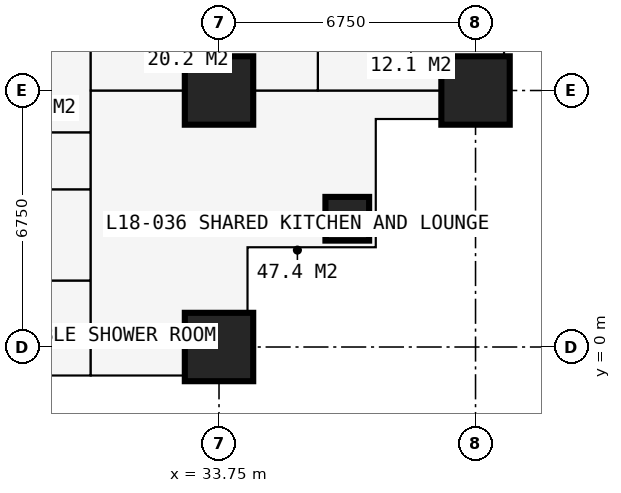
"""IFC4 building model, lengths in metres.
Left out: names, types, materials, properties, quantities, classifications, styles, units other than length and angle.
Written with IfcOpenShell. Run it as: python <this file> out.ifc"""

import sys

from ifc_helpers import new_model, si_unit, direction, frame, frame_2d, origin, origin_2d, place, context, subcontext, project, spatial, rectangle, extrude, element, fill, save


model = new_model("IFC4")
c1 = context("Model", 3, precision=1e-05, world=origin(), true_north=direction((0.0, 1.0)))
c2 = subcontext(c1, "Body", "Model", "MODEL_VIEW")
j1 = project(units=[si_unit("LENGTHUNIT", "METRE"), si_unit("PLANEANGLEUNIT", "RADIAN")], contexts=[c1])
p1 = place(None, origin())
s1 = spatial("IfcSite", under=j1, at=p1, CompositionType="ELEMENT")
p2 = place(p1, origin())
s2 = spatial("IfcBuilding", under=s1, at=p2, CompositionType="ELEMENT")
p3 = place(p2, frame((0.0, 0.0, 68.4)))
s3 = spatial("IfcBuildingStorey", under=s2, at=p3, CompositionType="ELEMENT", Elevation=68.4)
for number, where, z_axis, x_axis in (
    (1, (33.75, 0.0, 0.0), (0.0, 0.0, 1.0), (1.0, 0.0, 0.0)),
    (2, (33.75, 6.75, 0.0), (0.0, 0.0, 1.0), (1.0, 0.0, 0.0)),
):
    element("IfcColumn", number, at=place(p3, frame(where, z_axis=z_axis, x_axis=x_axis)), inside=s3, PredefinedType="COLUMN", context=c2, shape_type="SweptSolid", body=[
        extrude(rectangle(XDim=1.8, YDim=1.8, at=origin_2d()), origin(), (0.0, 0.0, 1.0), 3.6),
    ])
p4 = place(p3, frame((37.125, 3.375, 0.0), z_axis=(0.0, 0.0, 1.0), x_axis=(1.0, 0.0, 0.0)))
e3 = element("IfcColumn", 3, at=p4, inside=s3, PredefinedType="COLUMN", context=c2, shape_type="SweptSolid", body=[
    extrude(rectangle(XDim=1.15, YDim=1.15, at=origin_2d()), origin(), (0.0, 0.0, 1.0), 3.6),
])
p5 = place(p3, frame((40.5, 6.75, 0.0), z_axis=(0.0, 0.0, 1.0), x_axis=(1.0, 0.0, 0.0)))
e4 = element("IfcColumn", 4, at=p5, inside=s3, PredefinedType="COLUMN", context=c2, shape_type="SweptSolid", body=[
    extrude(rectangle(XDim=1.8, YDim=1.8, at=origin_2d()), origin(), (0.0, 0.0, 1.0), 3.6),
])
p6 = place(p3, frame((34.5, -0.75, 0.0), z_axis=(0.0, 0.0, 1.0), x_axis=(0.0, 1.0, 0.0)))
e5 = element("IfcWall", 5, at=p6, inside=s3, PredefinedType="SOLIDWALL", context=c2, shape_type="SweptSolid", body=[
    extrude(rectangle(XDim=3.375, YDim=0.3, at=frame_2d((1.688, 0.0))), origin(), (0.0, 0.0, 1.0), 3.375),
])
p7 = place(p6, frame((1.833, 0.0, 0.9)))
e6 = element("IfcOpeningElement", 6, at=p7, cuts=e5, PredefinedType="OPENING", context=c2, shape_type="SweptSolid", body=[
    extrude(rectangle(XDim=1.2, YDim=1.8, at=frame_2d((0.6, 0.9))), frame((0.0, 0.16, 0.0), z_axis=(0.0, -1.0, 0.0), x_axis=(1.0, 0.0, 0.0)), (0.0, 0.0, 1.0), 0.32),
])
p8 = place(p3, frame((34.5, 2.625, 0.0), z_axis=(0.0, 0.0, 1.0), x_axis=(1.0, 0.0, 0.0)))
e7 = element("IfcWall", 7, at=p8, inside=s3, PredefinedType="SOLIDWALL", context=c2, shape_type="SweptSolid", body=[
    extrude(rectangle(XDim=3.375, YDim=0.3, at=frame_2d((1.688, 0.0))), origin(), (0.0, 0.0, 1.0), 3.375),
])
p9 = place(p8, frame((0.788, 0.0, 0.6)))
e8 = element("IfcOpeningElement", 8, at=p9, cuts=e7, PredefinedType="OPENING", context=c2, shape_type="SweptSolid", body=[
    extrude(rectangle(XDim=1.8, YDim=2.1, at=frame_2d((0.9, 1.05))), frame((0.0, 0.16, 0.0), z_axis=(0.0, -1.0, 0.0), x_axis=(1.0, 0.0, 0.0)), (0.0, 0.0, 1.0), 0.32),
])
p10 = place(p3, frame((37.875, 2.625, 0.0), z_axis=(0.0, 0.0, 1.0), x_axis=(0.0, 1.0, 0.0)))
e9 = element("IfcWall", 9, at=p10, inside=s3, PredefinedType="SOLIDWALL", context=c2, shape_type="SweptSolid", body=[
    extrude(rectangle(XDim=3.375, YDim=0.3, at=frame_2d((1.688, 0.0))), origin(), (0.0, 0.0, 1.0), 3.375),
])
p11 = place(p10, frame((0.788, 0.0, 0.6)))
e10 = element("IfcOpeningElement", 10, at=p11, cuts=e9, PredefinedType="OPENING", context=c2, shape_type="SweptSolid", body=[
    extrude(rectangle(XDim=1.8, YDim=2.1, at=frame_2d((0.9, 1.05))), frame((0.0, 0.16, 0.0), z_axis=(0.0, -1.0, 0.0), x_axis=(1.0, 0.0, 0.0)), (0.0, 0.0, 1.0), 0.32),
])
p12 = place(p3, frame((37.875, 6.0, 0.0), z_axis=(0.0, 0.0, 1.0), x_axis=(1.0, 0.0, 0.0)))
e11 = element("IfcWall", 11, at=p12, inside=s3, PredefinedType="SOLIDWALL", context=c2, shape_type="SweptSolid", body=[
    extrude(rectangle(XDim=3.375, YDim=0.3, at=frame_2d((1.688, 0.0))), origin(), (0.0, 0.0, 1.0), 3.375),
])
p13 = place(p12, frame((0.343, 0.0, 0.9)))
e12 = element("IfcOpeningElement", 12, at=p13, cuts=e11, PredefinedType="OPENING", context=c2, shape_type="SweptSolid", body=[
    extrude(rectangle(XDim=1.2, YDim=1.8, at=frame_2d((0.6, 0.9))), frame((0.0, 0.16, 0.0), z_axis=(0.0, -1.0, 0.0), x_axis=(1.0, 0.0, 0.0)), (0.0, 0.0, 1.0), 0.32),
])
p14 = place(p3, frame((6.75, 4.15, 0.0), z_axis=(0.0, 0.0, 1.0), x_axis=(1.0, 0.0, 0.0)))
e13 = element("IfcWall", 13, at=p14, inside=s3, PredefinedType="PARTITIONING", context=c2, shape_type="SweptSolid", body=[
    extrude(rectangle(XDim=23.625, YDim=0.1, at=frame_2d((11.812, 0.0))), origin(), (0.0, 0.0, 1.0), 3.375),
])
p15 = place(p14, frame((0.2, 0.0, 0.0)))
e14 = element("IfcOpeningElement", 14, at=p15, cuts=e13, PredefinedType="OPENING", context=c2, shape_type="SweptSolid", body=[
    extrude(rectangle(XDim=0.95, YDim=2.2, at=frame_2d((0.475, 1.1))), frame((0.0, 0.06, 0.0), z_axis=(0.0, -1.0, 0.0), x_axis=(1.0, 0.0, 0.0)), (0.0, 0.0, 1.0), 0.12),
])
p16 = place(p14, frame((3.625, 0.0, 0.0)))
e15 = element("IfcOpeningElement", 15, at=p16, cuts=e13, PredefinedType="OPENING", context=c2, shape_type="SweptSolid", body=[
    extrude(rectangle(XDim=0.95, YDim=2.2, at=frame_2d((0.475, 1.1))), frame((0.0, 0.06, 0.0), z_axis=(0.0, -1.0, 0.0), x_axis=(1.0, 0.0, 0.0)), (0.0, 0.0, 1.0), 0.12),
])
p17 = place(p14, frame((7.0, 0.0, 0.0)))
e16 = element("IfcOpeningElement", 16, at=p17, cuts=e13, PredefinedType="OPENING", context=c2, shape_type="SweptSolid", body=[
    extrude(rectangle(XDim=0.95, YDim=2.2, at=frame_2d((0.475, 1.1))), frame((0.0, 0.06, 0.0), z_axis=(0.0, -1.0, 0.0), x_axis=(1.0, 0.0, 0.0)), (0.0, 0.0, 1.0), 0.12),
])
p18 = place(p14, frame((10.375, 0.0, 0.0)))
e17 = element("IfcOpeningElement", 17, at=p18, cuts=e13, PredefinedType="OPENING", context=c2, shape_type="SweptSolid", body=[
    extrude(rectangle(XDim=0.95, YDim=2.2, at=frame_2d((0.475, 1.1))), frame((0.0, 0.06, 0.0), z_axis=(0.0, -1.0, 0.0), x_axis=(1.0, 0.0, 0.0)), (0.0, 0.0, 1.0), 0.12),
])
p19 = place(p14, frame((18.475, 0.0, 0.0)))
e18 = element("IfcOpeningElement", 18, at=p19, cuts=e13, PredefinedType="OPENING", context=c2, shape_type="SweptSolid", body=[
    extrude(rectangle(XDim=0.95, YDim=2.2, at=frame_2d((0.475, 1.1))), frame((0.0, 0.06, 0.0), z_axis=(0.0, -1.0, 0.0), x_axis=(1.0, 0.0, 0.0)), (0.0, 0.0, 1.0), 0.12),
])
p20 = place(p14, frame((13.7, 0.0, 0.0)))
e19 = element("IfcOpeningElement", 19, at=p20, cuts=e13, PredefinedType="OPENING", context=c2, shape_type="SweptSolid", body=[
    extrude(rectangle(XDim=0.95, YDim=2.2, at=frame_2d((0.475, 1.1))), frame((0.0, 0.06, 0.0), z_axis=(0.0, -1.0, 0.0), x_axis=(1.0, 0.0, 0.0)), (0.0, 0.0, 1.0), 0.12),
])
p21 = place(p3, frame((22.988, 5.65, 0.0), z_axis=(0.0, 0.0, 1.0), x_axis=(1.0, 0.0, 0.0)))
e20 = element("IfcWall", 20, at=p21, inside=s3, PredefinedType="PARTITIONING", context=c2, shape_type="SweptSolid", body=[
    extrude(rectangle(XDim=7.387, YDim=0.15, at=frame_2d((3.694, 0.0))), origin(), (0.0, 0.0, 1.0), 3.375),
])
p22 = place(p21, frame((2.15, 0.0, 0.0)))
e21 = element("IfcOpeningElement", 21, at=p22, cuts=e20, PredefinedType="OPENING", context=c2, shape_type="SweptSolid", body=[
    extrude(rectangle(XDim=0.95, YDim=2.2, at=frame_2d((0.475, 1.1))), frame((0.0, 0.085, 0.0), z_axis=(0.0, -1.0, 0.0), x_axis=(1.0, 0.0, 0.0)), (0.0, 0.0, 1.0), 0.17),
])
p23 = place(p3, frame((27.775, 1.75, 0.0), z_axis=(0.0, 0.0, 1.0), x_axis=(1.0, 0.0, 0.0)))
e22 = element("IfcWall", 22, at=p23, inside=s3, PredefinedType="PARTITIONING", context=c2, shape_type="SweptSolid", body=[
    extrude(rectangle(XDim=2.6, YDim=0.1, at=frame_2d((1.3, 0.0))), origin(), (0.0, 0.0, 1.0), 3.375),
])
p24 = place(p23, frame((0.85, 0.0, 0.0)))
e23 = element("IfcOpeningElement", 23, at=p24, cuts=e22, PredefinedType="OPENING", context=c2, shape_type="SweptSolid", body=[
    extrude(rectangle(XDim=0.9, YDim=2.2, at=frame_2d((0.45, 1.1))), frame((0.0, 0.06, 0.0), z_axis=(0.0, -1.0, 0.0), x_axis=(1.0, 0.0, 0.0)), (0.0, 0.0, 1.0), 0.12),
])
p25 = place(p3, frame((30.375, -0.734, 0.0), z_axis=(0.0, 0.0, 1.0), x_axis=(0.0, 1.0, 0.0)))
e24 = element("IfcWall", 24, at=p25, inside=s3, PredefinedType="PARTITIONING", context=c2, shape_type="SweptSolid", body=[
    extrude(rectangle(XDim=12.034, YDim=0.15, at=frame_2d((6.017, 0.0))), origin(), (0.0, 0.0, 1.0), 3.375),
])
p26 = place(p3, frame((30.375, 6.75, 0.0), z_axis=(0.0, 0.0, 1.0), x_axis=(1.0, 0.0, 0.0)))
e25 = element("IfcWall", 25, at=p26, inside=s3, PredefinedType="PARTITIONING", context=c2, shape_type="SweptSolid", body=[
    extrude(rectangle(XDim=10.859, YDim=0.15, at=frame_2d((5.429, 0.0))), origin(), (0.0, 0.0, 1.0), 2.877),
])
p27 = place(p26, frame((1.45, 0.0, 0.0)))
e26 = element("IfcOpeningElement", 26, at=p27, cuts=e25, PredefinedType="OPENING", context=c2, shape_type="SweptSolid", body=[
    extrude(rectangle(XDim=1.0, YDim=2.2, at=frame_2d((0.5, 1.1))), frame((0.0, 0.085, 0.0), z_axis=(0.0, -1.0, 0.0), x_axis=(1.0, 0.0, 0.0)), (0.0, 0.0, 1.0), 0.17),
])
p28 = place(p3, frame((36.35, 6.75, 0.0), z_axis=(0.0, 0.0, 1.0), x_axis=(0.0, 1.0, 0.0)))
e27 = element("IfcWall", 27, at=p28, inside=s3, PredefinedType="PARTITIONING", context=c2, shape_type="SweptSolid", body=[
    extrude(rectangle(XDim=23.625, YDim=0.15, at=frame_2d((11.812, 0.0))), origin(), (0.0, 0.0, 1.0), 3.375),
])
p29 = place(p28, frame((0.2, 0.0, 0.0)))
e28 = element("IfcOpeningElement", 28, at=p29, cuts=e27, PredefinedType="OPENING", context=c2, shape_type="SweptSolid", body=[
    extrude(rectangle(XDim=0.95, YDim=2.2, at=frame_2d((0.475, 1.1))), frame((0.0, 0.085, 0.0), z_axis=(0.0, -1.0, 0.0), x_axis=(1.0, 0.0, 0.0)), (0.0, 0.0, 1.0), 0.17),
])
p30 = place(p28, frame((18.475, 0.0, 0.0)))
e29 = element("IfcOpeningElement", 29, at=p30, cuts=e27, PredefinedType="OPENING", context=c2, shape_type="SweptSolid", body=[
    extrude(rectangle(XDim=0.95, YDim=2.2, at=frame_2d((0.475, 1.1))), frame((0.0, 0.085, 0.0), z_axis=(0.0, -1.0, 0.0), x_axis=(1.0, 0.0, 0.0)), (0.0, 0.0, 1.0), 0.17),
])
p31 = place(p28, frame((11.725, 0.0, 0.0)))
e30 = element("IfcOpeningElement", 30, at=p31, cuts=e27, PredefinedType="OPENING", context=c2, shape_type="SweptSolid", body=[
    extrude(rectangle(XDim=0.95, YDim=2.2, at=frame_2d((0.475, 1.1))), frame((0.0, 0.085, 0.0), z_axis=(0.0, -1.0, 0.0), x_axis=(1.0, 0.0, 0.0)), (0.0, 0.0, 1.0), 0.17),
])
p32 = place(p28, frame((4.975, 0.0, 0.0)))
e31 = element("IfcOpeningElement", 31, at=p32, cuts=e27, PredefinedType="OPENING", context=c2, shape_type="SweptSolid", body=[
    extrude(rectangle(XDim=0.95, YDim=2.2, at=frame_2d((0.475, 1.1))), frame((0.0, 0.085, 0.0), z_axis=(0.0, -1.0, 0.0), x_axis=(1.0, 0.0, 0.0)), (0.0, 0.0, 1.0), 0.17),
])
p33 = place(p7, origin())
e32 = element("IfcWindow", 32, at=p33, inside=s3, PartitioningType="SINGLE_PANEL", PredefinedType="WINDOW", context=c2, shape_type="SweptSolid", body=[
    extrude(rectangle(XDim=1.2, YDim=1.8, at=frame_2d((0.6, 0.9))), frame((0.0, 0.03, 0.0), z_axis=(0.0, -1.0, 0.0), x_axis=(1.0, 0.0, 0.0)), (0.0, 0.0, 1.0), 0.06),
])
fill(e6, e32)
p34 = place(p9, origin())
e33 = element("IfcWindow", 33, at=p34, inside=s3, PartitioningType="SINGLE_PANEL", PredefinedType="WINDOW", context=c2, shape_type="SweptSolid", body=[
    extrude(rectangle(XDim=1.8, YDim=2.1, at=frame_2d((0.9, 1.05))), frame((0.0, 0.03, 0.0), z_axis=(0.0, -1.0, 0.0), x_axis=(1.0, 0.0, 0.0)), (0.0, 0.0, 1.0), 0.06),
])
fill(e8, e33)
p35 = place(p11, origin())
e34 = element("IfcWindow", 34, at=p35, inside=s3, PartitioningType="SINGLE_PANEL", PredefinedType="WINDOW", context=c2, shape_type="SweptSolid", body=[
    extrude(rectangle(XDim=1.8, YDim=2.1, at=frame_2d((0.9, 1.05))), frame((0.0, 0.03, 0.0), z_axis=(0.0, -1.0, 0.0), x_axis=(1.0, 0.0, 0.0)), (0.0, 0.0, 1.0), 0.06),
])
fill(e10, e34)
p36 = place(p13, origin())
e35 = element("IfcWindow", 35, at=p36, inside=s3, PartitioningType="SINGLE_PANEL", PredefinedType="WINDOW", context=c2, shape_type="SweptSolid", body=[
    extrude(rectangle(XDim=1.2, YDim=1.8, at=frame_2d((0.6, 0.9))), frame((0.0, 0.03, 0.0), z_axis=(0.0, -1.0, 0.0), x_axis=(1.0, 0.0, 0.0)), (0.0, 0.0, 1.0), 0.06),
])
fill(e12, e35)
p37 = place(p24, origin())
e36 = element("IfcDoor", 36, at=p37, inside=s3, OperationType="SINGLE_SWING_RIGHT", PredefinedType="DOOR", context=c2, shape_type="SweptSolid", body=[
    extrude(rectangle(XDim=0.9, YDim=2.2, at=frame_2d((0.45, 1.1))), frame((0.0, 0.025, 0.0), z_axis=(0.0, -1.0, 0.0), x_axis=(1.0, 0.0, 0.0)), (0.0, 0.0, 1.0), 0.05),
])
fill(e23, e36)
p38 = place(p27, origin())
e37 = element("IfcDoor", 37, at=p38, inside=s3, OperationType="SINGLE_SWING_LEFT", PredefinedType="DOOR", context=c2, shape_type="SweptSolid", body=[
    extrude(rectangle(XDim=1.0, YDim=2.2, at=frame_2d((0.5, 1.1))), frame((0.0, 0.025, 0.0), z_axis=(0.0, -1.0, 0.0), x_axis=(1.0, 0.0, 0.0)), (0.0, 0.0, 1.0), 0.05),
])
fill(e26, e37)
p39 = place(p29, origin())
e38 = element("IfcDoor", 38, at=p39, inside=s3, OperationType="SINGLE_SWING_LEFT", PredefinedType="DOOR", context=c2, shape_type="SweptSolid", body=[
    extrude(rectangle(XDim=0.95, YDim=2.2, at=frame_2d((0.475, 1.1))), frame((0.0, 0.025, 0.0), z_axis=(0.0, -1.0, 0.0), x_axis=(1.0, 0.0, 0.0)), (0.0, 0.0, 1.0), 0.05),
])
fill(e28, e38)
save(model, sys.argv[1])
